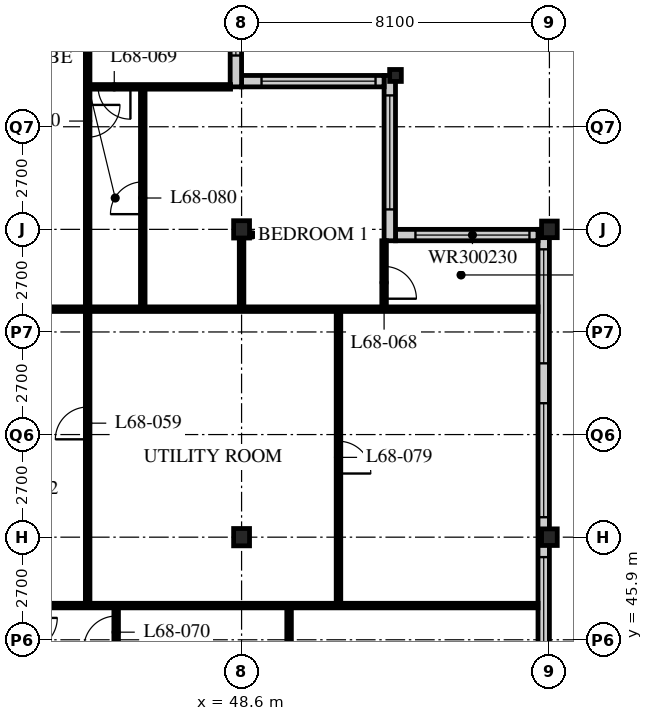
"""IFC4 building model, lengths in metres.
Left out: names, types, materials, properties, quantities, classifications, styles, units other than length and angle.
Written with IfcOpenShell. Run it as: python <this file> out.ifc"""

import sys

from ifc_helpers import new_model, si_unit, direction, frame, frame_2d, origin, origin_2d, place, context, subcontext, project, spatial, rectangle, i_section, extrude, element, fill, save


model = new_model("IFC4")
c1 = context("Model", 3, precision=1e-05, world=origin(), true_north=direction((0.0, 1.0)))
c2 = subcontext(c1, "Body", "Model", "MODEL_VIEW")
j1 = project(units=[si_unit("LENGTHUNIT", "METRE"), si_unit("PLANEANGLEUNIT", "RADIAN")], contexts=[c1])
p1 = place(None, origin())
s1 = spatial("IfcSite", under=j1, at=p1, CompositionType="ELEMENT")
p2 = place(p1, origin())
s2 = spatial("IfcBuilding", under=s1, at=p2, CompositionType="ELEMENT")
p3 = place(p2, frame((0.0, 0.0, 265.8)))
s3 = spatial("IfcBuildingStorey", under=s2, at=p3, CompositionType="ELEMENT", Elevation=265.8)
for number, where, z_axis, x_axis in (
    (1, (48.6, 48.6, 0.0), (0.0, 0.0, 1.0), (1.0, 0.0, 0.0)),
    (2, (48.6, 56.7, 0.0), (0.0, 0.0, 1.0), (1.0, 0.0, 0.0)),
):
    element("IfcColumn", number, at=place(p3, frame(where, z_axis=z_axis, x_axis=x_axis)), inside=s3, PredefinedType="COLUMN", context=c2, shape_type="SweptSolid", body=[
        extrude(i_section(OverallWidth=0.418, OverallDepth=0.456, WebThickness=0.042, FlangeThickness=0.067, FilletRadius=0.015, at=origin_2d()), origin(), (0.0, 0.0, 1.0), 3.9),
    ])
p4 = place(p3, frame((52.65, 60.75, 0.0), z_axis=(0.0, 0.0, 1.0), x_axis=(1.0, 0.0, 0.0)))
e3 = element("IfcColumn", 3, at=p4, inside=s3, PredefinedType="COLUMN", context=c2, shape_type="SweptSolid", body=[
    extrude(i_section(OverallWidth=0.307, OverallDepth=0.314, WebThickness=0.012, FlangeThickness=0.019, FilletRadius=0.015, at=origin_2d()), origin(), (0.0, 0.0, 1.0), 3.9),
])
for number, where, z_axis, x_axis in (
    (4, (56.7, 48.6, 0.0), (0.0, 0.0, 1.0), (1.0, 0.0, 0.0)),
    (5, (56.7, 56.7, 0.0), (0.0, 0.0, 1.0), (1.0, 0.0, 0.0)),
):
    element("IfcColumn", number, at=place(p3, frame(where, z_axis=z_axis, x_axis=x_axis)), inside=s3, PredefinedType="COLUMN", context=c2, shape_type="SweptSolid", body=[
        extrude(i_section(OverallWidth=0.412, OverallDepth=0.437, WebThickness=0.036, FlangeThickness=0.058, FilletRadius=0.015, at=origin_2d()), origin(), (0.0, 0.0, 1.0), 3.9),
    ])
p5 = place(p3, frame((56.55, 24.6, 0.0), z_axis=(0.0, 0.0, 1.0), x_axis=(0.0, 1.0, 0.0)))
e6 = element("IfcWall", 6, at=p5, inside=s3, PredefinedType="SOLIDWALL", context=c2, shape_type="SweptSolid", body=[
    extrude(rectangle(XDim=32.1, YDim=0.3, at=frame_2d((16.05, 0.0))), origin(), (0.0, 0.0, 1.0), 3.69),
])
p6 = place(p5, frame((0.225, 0.0, 0.6)))
e7 = element("IfcOpeningElement", 7, at=p6, cuts=e6, PredefinedType="OPENING", context=c2, shape_type="SweptSolid", body=[
    extrude(rectangle(XDim=3.0, YDim=2.4, at=frame_2d((1.5, 1.2))), frame((0.0, 0.16, 0.0), z_axis=(0.0, -1.0, 0.0), x_axis=(1.0, 0.0, 0.0)), (0.0, 0.0, 1.0), 0.32),
])
p7 = place(p5, frame((4.275, 0.0, 0.6)))
e8 = element("IfcOpeningElement", 8, at=p7, cuts=e6, PredefinedType="OPENING", context=c2, shape_type="SweptSolid", body=[
    extrude(rectangle(XDim=3.0, YDim=2.4, at=frame_2d((1.5, 1.2))), frame((0.0, 0.16, 0.0), z_axis=(0.0, -1.0, 0.0), x_axis=(1.0, 0.0, 0.0)), (0.0, 0.0, 1.0), 0.32),
])
p8 = place(p5, frame((8.325, 0.0, 0.6)))
e9 = element("IfcOpeningElement", 9, at=p8, cuts=e6, PredefinedType="OPENING", context=c2, shape_type="SweptSolid", body=[
    extrude(rectangle(XDim=3.0, YDim=2.4, at=frame_2d((1.5, 1.2))), frame((0.0, 0.16, 0.0), z_axis=(0.0, -1.0, 0.0), x_axis=(1.0, 0.0, 0.0)), (0.0, 0.0, 1.0), 0.32),
])
p9 = place(p5, frame((12.375, 0.0, 0.6)))
e10 = element("IfcOpeningElement", 10, at=p9, cuts=e6, PredefinedType="OPENING", context=c2, shape_type="SweptSolid", body=[
    extrude(rectangle(XDim=3.0, YDim=2.4, at=frame_2d((1.5, 1.2))), frame((0.0, 0.16, 0.0), z_axis=(0.0, -1.0, 0.0), x_axis=(1.0, 0.0, 0.0)), (0.0, 0.0, 1.0), 0.32),
])
p10 = place(p5, frame((16.425, 0.0, 0.6)))
e11 = element("IfcOpeningElement", 11, at=p10, cuts=e6, PredefinedType="OPENING", context=c2, shape_type="SweptSolid", body=[
    extrude(rectangle(XDim=3.0, YDim=2.4, at=frame_2d((1.5, 1.2))), frame((0.0, 0.16, 0.0), z_axis=(0.0, -1.0, 0.0), x_axis=(1.0, 0.0, 0.0)), (0.0, 0.0, 1.0), 0.32),
])
p11 = place(p5, frame((20.475, 0.0, 0.6)))
e12 = element("IfcOpeningElement", 12, at=p11, cuts=e6, PredefinedType="OPENING", context=c2, shape_type="SweptSolid", body=[
    extrude(rectangle(XDim=3.0, YDim=2.4, at=frame_2d((1.5, 1.2))), frame((0.0, 0.16, 0.0), z_axis=(0.0, -1.0, 0.0), x_axis=(1.0, 0.0, 0.0)), (0.0, 0.0, 1.0), 0.32),
])
p12 = place(p5, frame((24.525, 0.0, 0.6)))
e13 = element("IfcOpeningElement", 13, at=p12, cuts=e6, PredefinedType="OPENING", context=c2, shape_type="SweptSolid", body=[
    extrude(rectangle(XDim=3.0, YDim=2.4, at=frame_2d((1.5, 1.2))), frame((0.0, 0.16, 0.0), z_axis=(0.0, -1.0, 0.0), x_axis=(1.0, 0.0, 0.0)), (0.0, 0.0, 1.0), 0.32),
])
p13 = place(p5, frame((28.575, 0.0, 0.6)))
e14 = element("IfcOpeningElement", 14, at=p13, cuts=e6, PredefinedType="OPENING", context=c2, shape_type="SweptSolid", body=[
    extrude(rectangle(XDim=3.0, YDim=2.4, at=frame_2d((1.5, 1.2))), frame((0.0, 0.16, 0.0), z_axis=(0.0, -1.0, 0.0), x_axis=(1.0, 0.0, 0.0)), (0.0, 0.0, 1.0), 0.32),
])
p14 = place(p3, frame((56.4, 56.55, 0.0), z_axis=(0.0, 0.0, 1.0), x_axis=(-1.0, 0.0, 0.0)))
e15 = element("IfcWall", 15, at=p14, inside=s3, PredefinedType="SOLIDWALL", context=c2, shape_type="SweptSolid", body=[
    extrude(rectangle(XDim=3.75, YDim=0.3, at=frame_2d((1.875, 0.0))), origin(), (0.0, 0.0, 1.0), 3.69),
])
p15 = place(p14, frame((0.225, 0.0, 0.6)))
e16 = element("IfcOpeningElement", 16, at=p15, cuts=e15, PredefinedType="OPENING", context=c2, shape_type="SweptSolid", body=[
    extrude(rectangle(XDim=3.0, YDim=2.3, at=frame_2d((1.5, 1.15))), frame((0.0, 0.16, 0.0), z_axis=(0.0, -1.0, 0.0), x_axis=(1.0, 0.0, 0.0)), (0.0, 0.0, 1.0), 0.32),
])
p16 = place(p3, frame((52.5, 56.4, 0.0), z_axis=(0.0, 0.0, 1.0), x_axis=(0.0, 1.0, 0.0)))
e17 = element("IfcWall", 17, at=p16, inside=s3, PredefinedType="SOLIDWALL", context=c2, shape_type="SweptSolid", body=[
    extrude(rectangle(XDim=4.35, YDim=0.3, at=frame_2d((2.175, 0.0))), origin(), (0.0, 0.0, 1.0), 3.69),
])
p17 = place(p16, frame((0.825, 0.0, 0.6)))
e18 = element("IfcOpeningElement", 18, at=p17, cuts=e17, PredefinedType="OPENING", context=c2, shape_type="SweptSolid", body=[
    extrude(rectangle(XDim=3.0, YDim=2.3, at=frame_2d((1.5, 1.15))), frame((0.0, 0.16, 0.0), z_axis=(0.0, -1.0, 0.0), x_axis=(1.0, 0.0, 0.0)), (0.0, 0.0, 1.0), 0.32),
])
p18 = place(p3, frame((52.35, 60.6, 0.0), z_axis=(0.0, 0.0, 1.0), x_axis=(-1.0, 0.0, 0.0)))
e19 = element("IfcWall", 19, at=p18, inside=s3, PredefinedType="SOLIDWALL", context=c2, shape_type="SweptSolid", body=[
    extrude(rectangle(XDim=3.75, YDim=0.3, at=frame_2d((1.875, 0.0))), origin(), (0.0, 0.0, 1.0), 3.69),
])
p19 = place(p18, frame((0.225, 0.0, 0.6)))
e20 = element("IfcOpeningElement", 20, at=p19, cuts=e19, PredefinedType="OPENING", context=c2, shape_type="SweptSolid", body=[
    extrude(rectangle(XDim=3.0, YDim=2.3, at=frame_2d((1.5, 1.15))), frame((0.0, 0.16, 0.0), z_axis=(0.0, -1.0, 0.0), x_axis=(1.0, 0.0, 0.0)), (0.0, 0.0, 1.0), 0.32),
])
p20 = place(p3, frame((48.45, 60.45, 0.0), z_axis=(0.0, 0.0, 1.0), x_axis=(0.0, 1.0, 0.0)))
e21 = element("IfcWall", 21, at=p20, inside=s3, PredefinedType="SOLIDWALL", context=c2, shape_type="SweptSolid", body=[
    extrude(rectangle(XDim=4.35, YDim=0.3, at=frame_2d((2.175, 0.0))), origin(), (0.0, 0.0, 1.0), 3.69),
])
p21 = place(p20, frame((0.825, 0.0, 0.6)))
e22 = element("IfcOpeningElement", 22, at=p21, cuts=e21, PredefinedType="OPENING", context=c2, shape_type="SweptSolid", body=[
    extrude(rectangle(XDim=3.0, YDim=2.3, at=frame_2d((1.5, 1.15))), frame((0.0, 0.16, 0.0), z_axis=(0.0, -1.0, 0.0), x_axis=(1.0, 0.0, 0.0)), (0.0, 0.0, 1.0), 0.32),
])
p22 = place(p3, frame((42.9, 46.8, 0.0), z_axis=(0.0, 0.0, 1.0), x_axis=(1.0, 0.0, 0.0)))
e23 = element("IfcWall", 23, at=p22, inside=s3, PredefinedType="PARTITIONING", context=c2, shape_type="SweptSolid", body=[
    extrude(rectangle(XDim=13.5, YDim=0.12, at=frame_2d((6.75, 0.0))), origin(), (0.0, 0.0, 1.0), 3.69),
])
p23 = place(p3, frame((36.45, 54.6, 0.0), z_axis=(0.0, 0.0, 1.0), x_axis=(1.0, 0.0, 0.0)))
e24 = element("IfcWall", 24, at=p23, inside=s3, PredefinedType="PARTITIONING", context=c2, shape_type="SweptSolid", body=[
    extrude(rectangle(XDim=19.95, YDim=0.12, at=frame_2d((9.975, 0.0))), origin(), (0.0, 0.0, 1.0), 3.69),
])
p24 = place(p23, frame((1.675, 0.0, 0.0)))
e25 = element("IfcOpeningElement", 25, at=p24, cuts=e24, PredefinedType="OPENING", context=c2, shape_type="SweptSolid", body=[
    extrude(rectangle(XDim=0.85, YDim=2.1, at=frame_2d((0.425, 1.05))), frame((0.0, 0.07, 0.0), z_axis=(0.0, -1.0, 0.0), x_axis=(1.0, 0.0, 0.0)), (0.0, 0.0, 1.0), 0.14),
])
p25 = place(p3, frame((44.55, 64.5, 0.0), z_axis=(0.0, 0.0, 1.0), x_axis=(0.0, -1.0, 0.0)))
e26 = element("IfcWall", 26, at=p25, inside=s3, PredefinedType="PARTITIONING", context=c2, shape_type="SweptSolid", body=[
    extrude(rectangle(XDim=17.7, YDim=0.12, at=frame_2d((8.85, 0.0))), origin(), (0.0, 0.0, 1.0), 3.69),
])
p26 = place(p25, frame((12.475, 0.0, 0.0)))
e27 = element("IfcOpeningElement", 27, at=p26, cuts=e26, PredefinedType="OPENING", context=c2, shape_type="SweptSolid", body=[
    extrude(rectangle(XDim=0.85, YDim=2.1, at=frame_2d((0.425, 1.05))), frame((0.0, 0.07, 0.0), z_axis=(0.0, -1.0, 0.0), x_axis=(1.0, 0.0, 0.0)), (0.0, 0.0, 1.0), 0.14),
])
p27 = place(p25, frame((4.525, 0.0, 0.0)))
e28 = element("IfcOpeningElement", 28, at=p27, cuts=e26, PredefinedType="OPENING", context=c2, shape_type="SweptSolid", body=[
    extrude(rectangle(XDim=0.85, YDim=2.1, at=frame_2d((0.425, 1.05))), frame((0.0, 0.07, 0.0), z_axis=(0.0, -1.0, 0.0), x_axis=(1.0, 0.0, 0.0)), (0.0, 0.0, 1.0), 0.14),
])
p28 = place(p3, frame((52.35, 54.6, 0.0), z_axis=(0.0, 0.0, 1.0), x_axis=(0.0, 1.0, 0.0)))
e29 = element("IfcWall", 29, at=p28, inside=s3, PredefinedType="PARTITIONING", context=c2, shape_type="SweptSolid", body=[
    extrude(rectangle(XDim=1.8, YDim=0.12, at=frame_2d((0.9, 0.0))), origin(), (0.0, 0.0, 1.0), 3.69),
])
p29 = place(p28, frame((0.275, 0.0, 0.0)))
e30 = element("IfcOpeningElement", 30, at=p29, cuts=e29, PredefinedType="OPENING", context=c2, shape_type="SweptSolid", body=[
    extrude(rectangle(XDim=0.85, YDim=2.1, at=frame_2d((0.425, 1.05))), frame((0.0, 0.07, 0.0), z_axis=(0.0, -1.0, 0.0), x_axis=(1.0, 0.0, 0.0)), (0.0, 0.0, 1.0), 0.14),
])
p30 = place(p3, frame((48.31, 60.45, 0.0), z_axis=(0.0, 0.0, 1.0), x_axis=(-1.0, 0.0, 0.0)))
e31 = element("IfcWall", 31, at=p30, inside=s3, PredefinedType="PARTITIONING", context=c2, shape_type="SweptSolid", body=[
    extrude(rectangle(XDim=3.76, YDim=0.12, at=frame_2d((1.88, 0.0))), origin(), (0.0, 0.0, 1.0), 3.69),
])
p31 = place(p30, frame((2.635, 0.0, 0.0)))
e32 = element("IfcOpeningElement", 32, at=p31, cuts=e31, PredefinedType="OPENING", context=c2, shape_type="SweptSolid", body=[
    extrude(rectangle(XDim=0.85, YDim=2.1, at=frame_2d((0.425, 1.05))), frame((0.0, 0.07, 0.0), z_axis=(0.0, -1.0, 0.0), x_axis=(1.0, 0.0, 0.0)), (0.0, 0.0, 1.0), 0.14),
])
p32 = place(p3, frame((45.3, 46.8, 0.0), z_axis=(0.0, 0.0, 1.0), x_axis=(0.0, -1.0, 0.0)))
e33 = element("IfcWall", 33, at=p32, inside=s3, PredefinedType="PARTITIONING", context=c2, shape_type="SweptSolid", body=[
    extrude(rectangle(XDim=4.01, YDim=0.12, at=frame_2d((2.005, 0.0))), origin(), (0.0, 0.0, 1.0), 3.69),
])
p33 = place(p32, frame((0.275, 0.0, 0.0)))
e34 = element("IfcOpeningElement", 34, at=p33, cuts=e33, PredefinedType="OPENING", context=c2, shape_type="SweptSolid", body=[
    extrude(rectangle(XDim=0.85, YDim=2.1, at=frame_2d((0.425, 1.05))), frame((0.0, 0.07, 0.0), z_axis=(0.0, -1.0, 0.0), x_axis=(1.0, 0.0, 0.0)), (0.0, 0.0, 1.0), 0.14),
])
p34 = place(p3, frame((51.15, 46.8, 0.0), z_axis=(0.0, 0.0, 1.0), x_axis=(0.0, 1.0, 0.0)))
e35 = element("IfcWall", 35, at=p34, inside=s3, PredefinedType="PARTITIONING", context=c2, shape_type="SweptSolid", body=[
    extrude(rectangle(XDim=7.8, YDim=0.12, at=frame_2d((3.9, 0.0))), origin(), (0.0, 0.0, 1.0), 3.69),
])
p35 = place(p34, frame((3.475, 0.0, 0.0)))
e36 = element("IfcOpeningElement", 36, at=p35, cuts=e35, PredefinedType="OPENING", context=c2, shape_type="SweptSolid", body=[
    extrude(rectangle(XDim=0.85, YDim=2.1, at=frame_2d((0.425, 1.05))), frame((0.0, 0.07, 0.0), z_axis=(0.0, -1.0, 0.0), x_axis=(1.0, 0.0, 0.0)), (0.0, 0.0, 1.0), 0.14),
])
p36 = place(p3, frame((46.0, 54.6, 0.0), z_axis=(0.0, 0.0, 1.0), x_axis=(0.0, 1.0, 0.0)))
e37 = element("IfcWall", 37, at=p36, inside=s3, PredefinedType="PARTITIONING", context=c2, shape_type="SweptSolid", body=[
    extrude(rectangle(XDim=5.85, YDim=0.12, at=frame_2d((2.925, 0.0))), origin(), (0.0, 0.0, 1.0), 3.69),
])
p37 = place(p36, frame((2.5, 0.0, 0.0)))
e38 = element("IfcOpeningElement", 38, at=p37, cuts=e37, PredefinedType="OPENING", context=c2, shape_type="SweptSolid", body=[
    extrude(rectangle(XDim=0.85, YDim=2.1, at=frame_2d((0.425, 1.05))), frame((0.0, 0.07, 0.0), z_axis=(0.0, -1.0, 0.0), x_axis=(1.0, 0.0, 0.0)), (0.0, 0.0, 1.0), 0.14),
])
p38 = place(p3, frame((49.85, 40.5, 0.0), z_axis=(0.0, 0.0, 1.0), x_axis=(0.0, 1.0, 0.0)))
e39 = element("IfcWall", 39, at=p38, inside=s3, PredefinedType="PARTITIONING", context=c2, shape_type="SweptSolid", body=[
    extrude(rectangle(XDim=6.3, YDim=0.12, at=frame_2d((3.15, 0.0))), origin(), (0.0, 0.0, 1.0), 3.69),
])
p39 = place(p38, frame((2.725, 0.0, 0.0)))
e40 = element("IfcOpeningElement", 40, at=p39, cuts=e39, PredefinedType="OPENING", context=c2, shape_type="SweptSolid", body=[
    extrude(rectangle(XDim=0.85, YDim=2.1, at=frame_2d((0.425, 1.05))), frame((0.0, 0.07, 0.0), z_axis=(0.0, -1.0, 0.0), x_axis=(1.0, 0.0, 0.0)), (0.0, 0.0, 1.0), 0.14),
])
p40 = place(p3, frame((48.6, 54.6, 0.0), z_axis=(0.0, 0.0, 1.0), x_axis=(0.0, 1.0, 0.0)))
e41 = element("IfcWall", 41, at=p40, inside=s3, PredefinedType="PARTITIONING", context=c2, shape_type="SweptSolid", body=[
    extrude(rectangle(XDim=1.897, YDim=0.12, at=frame_2d((0.948, 0.0))), origin(), (0.0, 0.0, 1.0), 3.078),
])
p41 = place(p11, origin())
e42 = element("IfcWindow", 42, at=p41, inside=s3, PartitioningType="SINGLE_PANEL", PredefinedType="WINDOW", context=c2, shape_type="SweptSolid", body=[
    extrude(rectangle(XDim=3.0, YDim=2.4, at=frame_2d((1.5, 1.2))), frame((0.0, 0.03, 0.0), z_axis=(0.0, -1.0, 0.0), x_axis=(1.0, 0.0, 0.0)), (0.0, 0.0, 1.0), 0.06),
])
fill(e12, e42)
p42 = place(p12, origin())
e43 = element("IfcWindow", 43, at=p42, inside=s3, PartitioningType="SINGLE_PANEL", PredefinedType="WINDOW", context=c2, shape_type="SweptSolid", body=[
    extrude(rectangle(XDim=3.0, YDim=2.4, at=frame_2d((1.5, 1.2))), frame((0.0, 0.03, 0.0), z_axis=(0.0, -1.0, 0.0), x_axis=(1.0, 0.0, 0.0)), (0.0, 0.0, 1.0), 0.06),
])
fill(e13, e43)
p43 = place(p13, origin())
e44 = element("IfcWindow", 44, at=p43, inside=s3, PartitioningType="SINGLE_PANEL", PredefinedType="WINDOW", context=c2, shape_type="SweptSolid", body=[
    extrude(rectangle(XDim=3.0, YDim=2.4, at=frame_2d((1.5, 1.2))), frame((0.0, 0.03, 0.0), z_axis=(0.0, -1.0, 0.0), x_axis=(1.0, 0.0, 0.0)), (0.0, 0.0, 1.0), 0.06),
])
fill(e14, e44)
p44 = place(p15, origin())
e45 = element("IfcWindow", 45, at=p44, inside=s3, PartitioningType="SINGLE_PANEL", PredefinedType="WINDOW", context=c2, shape_type="SweptSolid", body=[
    extrude(rectangle(XDim=3.0, YDim=2.3, at=frame_2d((1.5, 1.15))), frame((0.0, 0.03, 0.0), z_axis=(0.0, -1.0, 0.0), x_axis=(1.0, 0.0, 0.0)), (0.0, 0.0, 1.0), 0.06),
])
fill(e16, e45)
p45 = place(p17, origin())
e46 = element("IfcWindow", 46, at=p45, inside=s3, PartitioningType="SINGLE_PANEL", PredefinedType="WINDOW", context=c2, shape_type="SweptSolid", body=[
    extrude(rectangle(XDim=3.0, YDim=2.3, at=frame_2d((1.5, 1.15))), frame((0.0, 0.03, 0.0), z_axis=(0.0, -1.0, 0.0), x_axis=(1.0, 0.0, 0.0)), (0.0, 0.0, 1.0), 0.06),
])
fill(e18, e46)
p46 = place(p19, origin())
e47 = element("IfcWindow", 47, at=p46, inside=s3, PartitioningType="SINGLE_PANEL", PredefinedType="WINDOW", context=c2, shape_type="SweptSolid", body=[
    extrude(rectangle(XDim=3.0, YDim=2.3, at=frame_2d((1.5, 1.15))), frame((0.0, 0.03, 0.0), z_axis=(0.0, -1.0, 0.0), x_axis=(1.0, 0.0, 0.0)), (0.0, 0.0, 1.0), 0.06),
])
fill(e20, e47)
p47 = place(p21, origin())
e48 = element("IfcWindow", 48, at=p47, inside=s3, PartitioningType="SINGLE_PANEL", PredefinedType="WINDOW", context=c2, shape_type="SweptSolid", body=[
    extrude(rectangle(XDim=3.0, YDim=2.3, at=frame_2d((1.5, 1.15))), frame((0.0, 0.03, 0.0), z_axis=(0.0, -1.0, 0.0), x_axis=(1.0, 0.0, 0.0)), (0.0, 0.0, 1.0), 0.06),
])
fill(e22, e48)
p48 = place(p26, origin())
e49 = element("IfcDoor", 49, at=p48, inside=s3, OperationType="SINGLE_SWING_LEFT", PredefinedType="DOOR", context=c2, shape_type="SweptSolid", body=[
    extrude(rectangle(XDim=0.85, YDim=2.1, at=frame_2d((0.425, 1.05))), frame((0.0, 0.025, 0.0), z_axis=(0.0, -1.0, 0.0), x_axis=(1.0, 0.0, 0.0)), (0.0, 0.0, 1.0), 0.05),
])
fill(e27, e49)
p49 = place(p27, origin())
e50 = element("IfcDoor", 50, at=p49, inside=s3, OperationType="SINGLE_SWING_LEFT", PredefinedType="DOOR", context=c2, shape_type="SweptSolid", body=[
    extrude(rectangle(XDim=0.85, YDim=2.1, at=frame_2d((0.425, 1.05))), frame((0.0, 0.025, 0.0), z_axis=(0.0, -1.0, 0.0), x_axis=(1.0, 0.0, 0.0)), (0.0, 0.0, 1.0), 0.05),
])
fill(e28, e50)
p50 = place(p29, origin())
e51 = element("IfcDoor", 51, at=p50, inside=s3, OperationType="SINGLE_SWING_RIGHT", PredefinedType="DOOR", context=c2, shape_type="SweptSolid", body=[
    extrude(rectangle(XDim=0.85, YDim=2.1, at=frame_2d((0.425, 1.05))), frame((0.0, 0.025, 0.0), z_axis=(0.0, -1.0, 0.0), x_axis=(1.0, 0.0, 0.0)), (0.0, 0.0, 1.0), 0.05),
])
fill(e30, e51)
p51 = place(p31, origin())
e52 = element("IfcDoor", 52, at=p51, inside=s3, OperationType="SINGLE_SWING_LEFT", PredefinedType="DOOR", context=c2, shape_type="SweptSolid", body=[
    extrude(rectangle(XDim=0.85, YDim=2.1, at=frame_2d((0.425, 1.05))), frame((0.0, 0.025, 0.0), z_axis=(0.0, -1.0, 0.0), x_axis=(1.0, 0.0, 0.0)), (0.0, 0.0, 1.0), 0.05),
])
fill(e32, e52)
p52 = place(p33, origin())
e53 = element("IfcDoor", 53, at=p52, inside=s3, OperationType="SINGLE_SWING_LEFT", PredefinedType="DOOR", context=c2, shape_type="SweptSolid", body=[
    extrude(rectangle(XDim=0.85, YDim=2.1, at=frame_2d((0.425, 1.05))), frame((0.0, 0.025, 0.0), z_axis=(0.0, -1.0, 0.0), x_axis=(1.0, 0.0, 0.0)), (0.0, 0.0, 1.0), 0.05),
])
fill(e34, e53)
p53 = place(p35, origin())
e54 = element("IfcDoor", 54, at=p53, inside=s3, OperationType="SINGLE_SWING_RIGHT", PredefinedType="DOOR", context=c2, shape_type="SweptSolid", body=[
    extrude(rectangle(XDim=0.85, YDim=2.1, at=frame_2d((0.425, 1.05))), frame((0.0, 0.025, 0.0), z_axis=(0.0, -1.0, 0.0), x_axis=(1.0, 0.0, 0.0)), (0.0, 0.0, 1.0), 0.05),
])
fill(e36, e54)
p54 = place(p37, origin())
e55 = element("IfcDoor", 55, at=p54, inside=s3, OperationType="SINGLE_SWING_LEFT", PredefinedType="DOOR", context=c2, shape_type="SweptSolid", body=[
    extrude(rectangle(XDim=0.85, YDim=2.1, at=frame_2d((0.425, 1.05))), frame((0.0, 0.025, 0.0), z_axis=(0.0, -1.0, 0.0), x_axis=(1.0, 0.0, 0.0)), (0.0, 0.0, 1.0), 0.05),
])
fill(e38, e55)
save(model, sys.argv[1])
